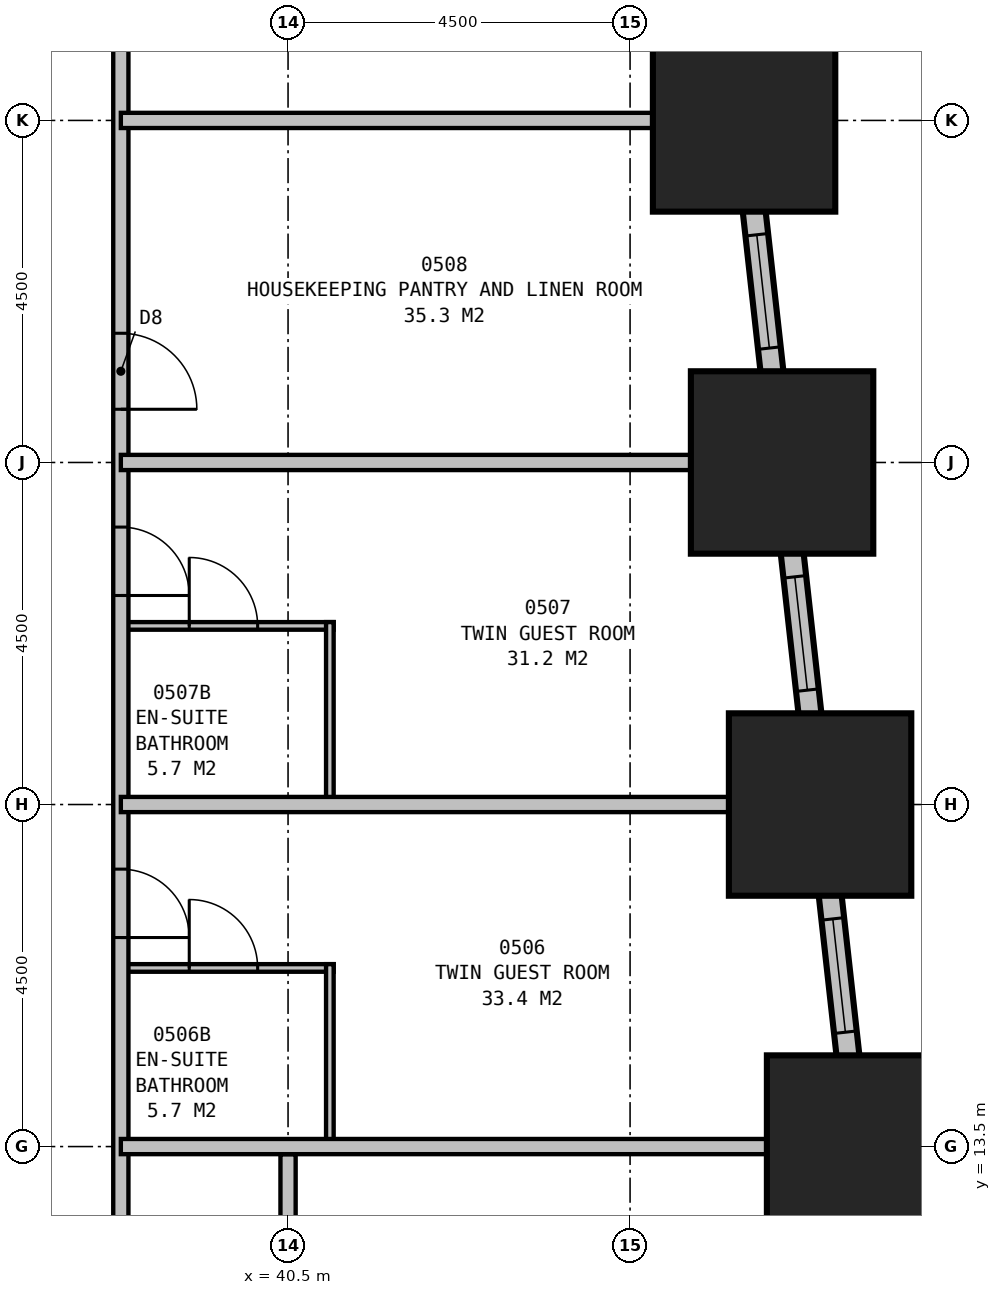
"""IFC4 building model, lengths in metres.
Left out: names, types, materials, properties, quantities, classifications, styles, units other than length and angle.
Written with IfcOpenShell. Run it as: python <this file> out.ifc"""

import sys

from ifc_helpers import new_model, si_unit, direction, frame, frame_2d, origin, origin_2d, place, context, subcontext, project, spatial, rectangle, extrude, element, fill, save


model = new_model("IFC4")
c1 = context("Model", 3, precision=1e-05, world=origin(), true_north=direction((0.0, 1.0)))
c2 = subcontext(c1, "Body", "Model", "MODEL_VIEW")
j1 = project(units=[si_unit("LENGTHUNIT", "METRE"), si_unit("PLANEANGLEUNIT", "RADIAN")], contexts=[c1])
p1 = place(None, origin())
s1 = spatial("IfcSite", under=j1, at=p1, CompositionType="ELEMENT")
p2 = place(p1, origin())
s2 = spatial("IfcBuilding", under=s1, at=p2, CompositionType="ELEMENT")
p3 = place(p2, frame((0.0, 0.0, 29.7)))
s3 = spatial("IfcBuildingStorey", under=s2, at=p3, CompositionType="ELEMENT", Elevation=29.7)
for number, where, z_axis, x_axis in (
    (1, (48.0, 13.5, 0.0), (0.0, 0.0, 1.0), (1.0, 0.0, 0.0)),
    (2, (47.5, 18.0, 0.0), (0.0, 0.0, 1.0), (1.0, 0.0, 0.0)),
    (3, (47.0, 22.5, 0.0), (0.0, 0.0, 1.0), (1.0, 0.0, 0.0)),
    (4, (46.5, 27.0, 0.0), (0.0, 0.0, 1.0), (1.0, 0.0, 0.0)),
):
    element("IfcColumn", number, at=place(p3, frame(where, z_axis=z_axis, x_axis=x_axis)), inside=s3, PredefinedType="COLUMN", context=c2, shape_type="SweptSolid", body=[
        extrude(rectangle(XDim=2.4, YDim=2.4, at=origin_2d()), origin(), (0.0, 0.0, 1.0), 3.5),
    ])
p4 = place(p3, frame((49.017, 4.351, 0.0), z_axis=(0.0, 0.0, 1.0), x_axis=(-0.110433201132, 0.993883548555, 0.0)))
e5 = element("IfcWall", 5, at=p4, inside=s3, PredefinedType="STANDARD", context=c2, shape_type="SweptSolid", body=[
    extrude(rectangle(XDim=31.994, YDim=0.3, at=frame_2d((15.997, 0.0))), origin(), (0.0, 0.0, 1.0), 2.05),
])
p5 = place(p4, frame((1.664, 0.0, 0.5)))
e6 = element("IfcOpeningElement", 6, at=p5, cuts=e5, PredefinedType="OPENING", context=c2, shape_type="SweptSolid", body=[
    extrude(rectangle(XDim=1.5, YDim=1.4, at=frame_2d((0.75, 0.7))), frame((0.0, 0.16, 0.0), z_axis=(0.0, -1.0, 0.0), x_axis=(1.0, 0.0, 0.0)), (0.0, 0.0, 1.0), 0.32),
])
p6 = place(p4, frame((6.192, 0.0, 0.5)))
e7 = element("IfcOpeningElement", 7, at=p6, cuts=e5, PredefinedType="OPENING", context=c2, shape_type="SweptSolid", body=[
    extrude(rectangle(XDim=1.5, YDim=1.4, at=frame_2d((0.75, 0.7))), frame((0.0, 0.16, 0.0), z_axis=(0.0, -1.0, 0.0), x_axis=(1.0, 0.0, 0.0)), (0.0, 0.0, 1.0), 0.32),
])
p7 = place(p4, frame((10.719, 0.0, 0.5)))
e8 = element("IfcOpeningElement", 8, at=p7, cuts=e5, PredefinedType="OPENING", context=c2, shape_type="SweptSolid", body=[
    extrude(rectangle(XDim=1.5, YDim=1.4, at=frame_2d((0.75, 0.7))), frame((0.0, 0.16, 0.0), z_axis=(0.0, -1.0, 0.0), x_axis=(1.0, 0.0, 0.0)), (0.0, 0.0, 1.0), 0.32),
])
p8 = place(p4, frame((15.247, 0.0, 0.5)))
e9 = element("IfcOpeningElement", 9, at=p8, cuts=e5, PredefinedType="OPENING", context=c2, shape_type="SweptSolid", body=[
    extrude(rectangle(XDim=1.5, YDim=1.4, at=frame_2d((0.75, 0.7))), frame((0.0, 0.16, 0.0), z_axis=(0.0, -1.0, 0.0), x_axis=(1.0, 0.0, 0.0)), (0.0, 0.0, 1.0), 0.32),
])
p9 = place(p4, frame((19.775, 0.0, 0.5)))
e10 = element("IfcOpeningElement", 10, at=p9, cuts=e5, PredefinedType="OPENING", context=c2, shape_type="SweptSolid", body=[
    extrude(rectangle(XDim=1.5, YDim=1.4, at=frame_2d((0.75, 0.7))), frame((0.0, 0.16, 0.0), z_axis=(0.0, -1.0, 0.0), x_axis=(1.0, 0.0, 0.0)), (0.0, 0.0, 1.0), 0.32),
])
p10 = place(p4, frame((24.302, 0.0, 0.5)))
e11 = element("IfcOpeningElement", 11, at=p10, cuts=e5, PredefinedType="OPENING", context=c2, shape_type="SweptSolid", body=[
    extrude(rectangle(XDim=1.5, YDim=1.4, at=frame_2d((0.75, 0.7))), frame((0.0, 0.16, 0.0), z_axis=(0.0, -1.0, 0.0), x_axis=(1.0, 0.0, 0.0)), (0.0, 0.0, 1.0), 0.32),
])
p11 = place(p4, frame((28.83, 0.0, 0.5)))
e12 = element("IfcOpeningElement", 12, at=p11, cuts=e5, PredefinedType="OPENING", context=c2, shape_type="SweptSolid", body=[
    extrude(rectangle(XDim=1.5, YDim=1.4, at=frame_2d((0.75, 0.7))), frame((0.0, 0.16, 0.0), z_axis=(0.0, -1.0, 0.0), x_axis=(1.0, 0.0, 0.0)), (0.0, 0.0, 1.0), 0.32),
])
p12 = place(p3, frame((38.3, 11.2, 0.0), z_axis=(0.0, 0.0, 1.0), x_axis=(0.0, 1.0, 0.0)))
e13 = element("IfcWall", 13, at=p12, inside=s3, PredefinedType="PARTITIONING", context=c2, shape_type="SweptSolid", body=[
    extrude(rectangle(XDim=18.1, YDim=0.2, at=frame_2d((9.05, 0.0))), origin(), (0.0, 0.0, 1.0), 3.25),
])
p13 = place(p12, frame((5.95, 0.0, 0.0), z_axis=(0.0, 0.0, 1.0), x_axis=(-1.0, 0.0, 0.0)))
e14 = element("IfcOpeningElement", 14, at=p13, cuts=e13, PredefinedType="OPENING", context=c2, shape_type="SweptSolid", body=[
    extrude(rectangle(XDim=0.9, YDim=2.1, at=frame_2d((0.45, 1.05))), frame((0.0, 0.11, 0.0), z_axis=(0.0, -1.0, 0.0), x_axis=(1.0, 0.0, 0.0)), (0.0, 0.0, 1.0), 0.22),
])
p14 = place(p12, frame((10.45, 0.0, 0.0), z_axis=(0.0, 0.0, 1.0), x_axis=(-1.0, 0.0, 0.0)))
e15 = element("IfcOpeningElement", 15, at=p14, cuts=e13, PredefinedType="OPENING", context=c2, shape_type="SweptSolid", body=[
    extrude(rectangle(XDim=0.9, YDim=2.1, at=frame_2d((0.45, 1.05))), frame((0.0, 0.11, 0.0), z_axis=(0.0, -1.0, 0.0), x_axis=(1.0, 0.0, 0.0)), (0.0, 0.0, 1.0), 0.22),
])
p15 = place(p12, frame((13.0, 0.0, 0.0), z_axis=(0.0, 0.0, 1.0), x_axis=(-1.0, 0.0, 0.0)))
e16 = element("IfcOpeningElement", 16, at=p15, cuts=e13, PredefinedType="OPENING", context=c2, shape_type="SweptSolid", body=[
    extrude(rectangle(XDim=1.0, YDim=2.1, at=frame_2d((0.5, 1.05))), frame((0.0, 0.11, 0.0), z_axis=(0.0, -1.0, 0.0), x_axis=(1.0, 0.0, 0.0)), (0.0, 0.0, 1.0), 0.22),
])
p16 = place(p3, frame((38.3, 18.0, 0.0), z_axis=(0.0, 0.0, 1.0), x_axis=(1.0, 0.0, 0.0)))
e17 = element("IfcWall", 17, at=p16, inside=s3, PredefinedType="PARTITIONING", context=c2, shape_type="SweptSolid", body=[
    extrude(rectangle(XDim=9.199, YDim=0.2, at=frame_2d((4.6, 0.0))), origin(), (0.0, 0.0, 1.0), 2.25),
])
p17 = place(p3, frame((38.3, 22.5, 0.0), z_axis=(0.0, 0.0, 1.0), x_axis=(1.0, 0.0, 0.0)))
e18 = element("IfcWall", 18, at=p17, inside=s3, PredefinedType="PARTITIONING", context=c2, shape_type="SweptSolid", body=[
    extrude(rectangle(XDim=8.699, YDim=0.2, at=frame_2d((4.35, 0.0))), origin(), (0.0, 0.0, 1.0), 2.25),
])
p18 = place(p3, frame((41.05, 13.5, 0.0), z_axis=(0.0, 0.0, 1.0), x_axis=(0.0, 1.0, 0.0)))
e19 = element("IfcWall", 19, at=p18, inside=s3, PredefinedType="PLUMBINGWALL", context=c2, shape_type="SweptSolid", body=[
    extrude(rectangle(XDim=2.4, YDim=0.1, at=frame_2d((1.2, 0.0))), origin(), (0.0, 0.0, 1.0), 3.25),
])
p19 = place(p3, frame((38.3, 15.85, 0.0), z_axis=(0.0, 0.0, 1.0), x_axis=(1.0, 0.0, 0.0)))
e20 = element("IfcWall", 20, at=p19, inside=s3, PredefinedType="PLUMBINGWALL", context=c2, shape_type="SweptSolid", body=[
    extrude(rectangle(XDim=2.8, YDim=0.1, at=frame_2d((1.4, 0.0))), origin(), (0.0, 0.0, 1.0), 3.25),
])
p20 = place(p19, frame((0.9, 0.0, 0.0)))
e21 = element("IfcOpeningElement", 21, at=p20, cuts=e20, PredefinedType="OPENING", context=c2, shape_type="SweptSolid", body=[
    extrude(rectangle(XDim=0.9, YDim=2.1, at=frame_2d((0.45, 1.05))), frame((0.0, 0.06, 0.0), z_axis=(0.0, -1.0, 0.0), x_axis=(1.0, 0.0, 0.0)), (0.0, 0.0, 1.0), 0.12),
])
p21 = place(p3, frame((41.05, 18.0, 0.0), z_axis=(0.0, 0.0, 1.0), x_axis=(0.0, 1.0, 0.0)))
e22 = element("IfcWall", 22, at=p21, inside=s3, PredefinedType="PLUMBINGWALL", context=c2, shape_type="SweptSolid", body=[
    extrude(rectangle(XDim=2.4, YDim=0.1, at=frame_2d((1.2, 0.0))), origin(), (0.0, 0.0, 1.0), 3.25),
])
p22 = place(p3, frame((38.3, 20.35, 0.0), z_axis=(0.0, 0.0, 1.0), x_axis=(1.0, 0.0, 0.0)))
e23 = element("IfcWall", 23, at=p22, inside=s3, PredefinedType="PLUMBINGWALL", context=c2, shape_type="SweptSolid", body=[
    extrude(rectangle(XDim=2.8, YDim=0.1, at=frame_2d((1.4, 0.0))), origin(), (0.0, 0.0, 1.0), 3.25),
])
p23 = place(p22, frame((0.9, 0.0, 0.0)))
e24 = element("IfcOpeningElement", 24, at=p23, cuts=e23, PredefinedType="OPENING", context=c2, shape_type="SweptSolid", body=[
    extrude(rectangle(XDim=0.9, YDim=2.1, at=frame_2d((0.45, 1.05))), frame((0.0, 0.06, 0.0), z_axis=(0.0, -1.0, 0.0), x_axis=(1.0, 0.0, 0.0)), (0.0, 0.0, 1.0), 0.12),
])
p24 = place(p3, frame((38.3, 13.5, 0.0), z_axis=(0.0, 0.0, 1.0), x_axis=(1.0, 0.0, 0.0)))
e25 = element("IfcWall", 25, at=p24, inside=s3, PredefinedType="PARTITIONING", context=c2, shape_type="SweptSolid", body=[
    extrude(rectangle(XDim=9.921, YDim=0.2, at=frame_2d((4.96, 0.0))), origin(), (0.0, 0.0, 1.0), 1.95),
])
p25 = place(p3, frame((40.5, 4.6, 0.0), z_axis=(0.0, 0.0, 1.0), x_axis=(0.0, 1.0, 0.0)))
e26 = element("IfcWall", 26, at=p25, inside=s3, PredefinedType="PARTITIONING", context=c2, shape_type="SweptSolid", body=[
    extrude(rectangle(XDim=8.8, YDim=0.2, at=frame_2d((4.4, 0.0))), origin(), (0.0, 0.0, 1.0), 2.25),
])
p26 = place(p25, frame((4.05, 0.0, 0.0)))
e27 = element("IfcOpeningElement", 27, at=p26, cuts=e26, PredefinedType="OPENING", context=c2, shape_type="SweptSolid", body=[
    extrude(rectangle(XDim=0.9, YDim=2.1, at=frame_2d((0.45, 1.05))), frame((0.0, 0.11, 0.0), z_axis=(0.0, -1.0, 0.0), x_axis=(1.0, 0.0, 0.0)), (0.0, 0.0, 1.0), 0.22),
])
p27 = place(p3, frame((38.3, 27.0, 0.0), z_axis=(0.0, 0.0, 1.0), x_axis=(1.0, 0.0, 0.0)))
e28 = element("IfcWall", 28, at=p27, inside=s3, PredefinedType="PARTITIONING", context=c2, shape_type="SweptSolid", body=[
    extrude(rectangle(XDim=7.977, YDim=0.2, at=frame_2d((3.988, 0.0))), origin(), (0.0, 0.0, 1.0), 1.95),
])
p28 = place(p7, origin())
e29 = element("IfcWindow", 29, at=p28, inside=s3, PartitioningType="SINGLE_PANEL", PredefinedType="WINDOW", context=c2, shape_type="SweptSolid", body=[
    extrude(rectangle(XDim=1.5, YDim=1.4, at=frame_2d((0.75, 0.7))), frame((0.0, 0.03, 0.0), z_axis=(0.0, -1.0, 0.0), x_axis=(1.0, 0.0, 0.0)), (0.0, 0.0, 1.0), 0.06),
])
fill(e8, e29)
p29 = place(p8, origin())
e30 = element("IfcWindow", 30, at=p29, inside=s3, PartitioningType="SINGLE_PANEL", PredefinedType="WINDOW", context=c2, shape_type="SweptSolid", body=[
    extrude(rectangle(XDim=1.5, YDim=1.4, at=frame_2d((0.75, 0.7))), frame((0.0, 0.03, 0.0), z_axis=(0.0, -1.0, 0.0), x_axis=(1.0, 0.0, 0.0)), (0.0, 0.0, 1.0), 0.06),
])
fill(e9, e30)
p30 = place(p9, origin())
e31 = element("IfcWindow", 31, at=p30, inside=s3, PartitioningType="SINGLE_PANEL", PredefinedType="WINDOW", context=c2, shape_type="SweptSolid", body=[
    extrude(rectangle(XDim=1.5, YDim=1.4, at=frame_2d((0.75, 0.7))), frame((0.0, 0.03, 0.0), z_axis=(0.0, -1.0, 0.0), x_axis=(1.0, 0.0, 0.0)), (0.0, 0.0, 1.0), 0.06),
])
fill(e10, e31)
p31 = place(p13, origin())
e32 = element("IfcDoor", 32, at=p31, inside=s3, OperationType="SINGLE_SWING_RIGHT", PredefinedType="DOOR", context=c2, shape_type="SweptSolid", body=[
    extrude(rectangle(XDim=0.9, YDim=2.1, at=frame_2d((0.45, 1.05))), frame((0.0, 0.025, 0.0), z_axis=(0.0, -1.0, 0.0), x_axis=(1.0, 0.0, 0.0)), (0.0, 0.0, 1.0), 0.05),
])
fill(e14, e32)
p32 = place(p14, origin())
e33 = element("IfcDoor", 33, at=p32, inside=s3, OperationType="SINGLE_SWING_RIGHT", PredefinedType="DOOR", context=c2, shape_type="SweptSolid", body=[
    extrude(rectangle(XDim=0.9, YDim=2.1, at=frame_2d((0.45, 1.05))), frame((0.0, 0.025, 0.0), z_axis=(0.0, -1.0, 0.0), x_axis=(1.0, 0.0, 0.0)), (0.0, 0.0, 1.0), 0.05),
])
fill(e15, e33)
p33 = place(p15, origin())
e34 = element("IfcDoor", 34, at=p33, inside=s3, OperationType="SINGLE_SWING_RIGHT", PredefinedType="DOOR", context=c2, shape_type="SweptSolid", body=[
    extrude(rectangle(XDim=1.0, YDim=2.1, at=frame_2d((0.5, 1.05))), frame((0.0, 0.025, 0.0), z_axis=(0.0, -1.0, 0.0), x_axis=(1.0, 0.0, 0.0)), (0.0, 0.0, 1.0), 0.05),
])
fill(e16, e34)
p34 = place(p20, origin())
e35 = element("IfcDoor", 35, at=p34, inside=s3, OperationType="SINGLE_SWING_LEFT", PredefinedType="DOOR", context=c2, shape_type="SweptSolid", body=[
    extrude(rectangle(XDim=0.9, YDim=2.1, at=frame_2d((0.45, 1.05))), frame((0.0, 0.025, 0.0), z_axis=(0.0, -1.0, 0.0), x_axis=(1.0, 0.0, 0.0)), (0.0, 0.0, 1.0), 0.05),
])
fill(e21, e35)
p35 = place(p23, origin())
e36 = element("IfcDoor", 36, at=p35, inside=s3, OperationType="SINGLE_SWING_LEFT", PredefinedType="DOOR", context=c2, shape_type="SweptSolid", body=[
    extrude(rectangle(XDim=0.9, YDim=2.1, at=frame_2d((0.45, 1.05))), frame((0.0, 0.025, 0.0), z_axis=(0.0, -1.0, 0.0), x_axis=(1.0, 0.0, 0.0)), (0.0, 0.0, 1.0), 0.05),
])
fill(e24, e36)
save(model, sys.argv[1])
